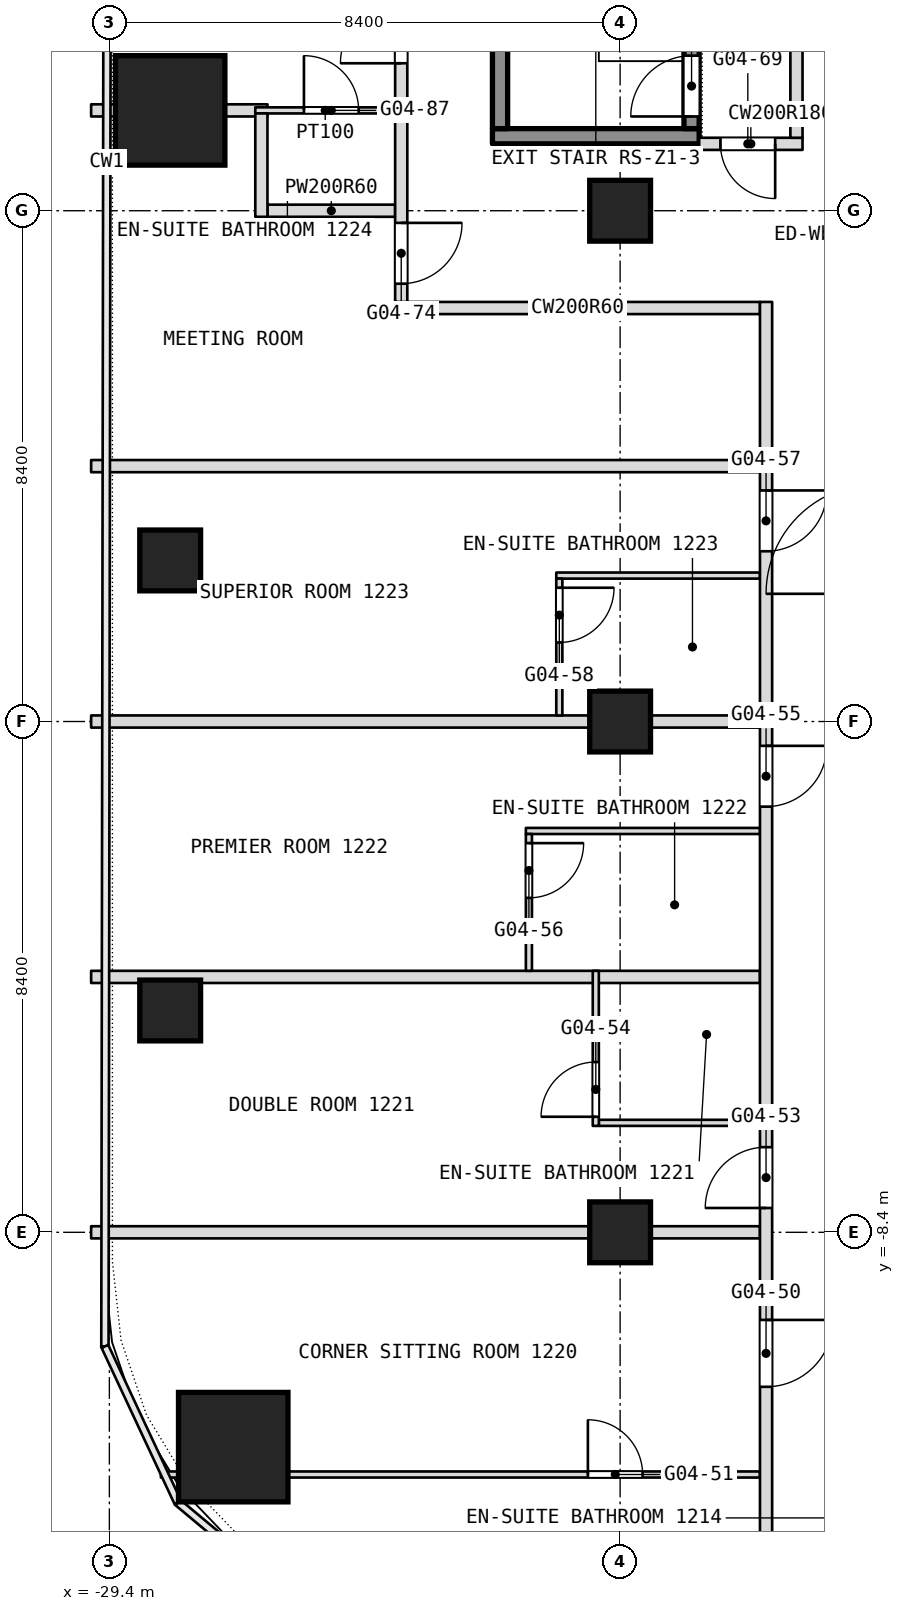
"""IFC4 building model, lengths in metres.
Left out: names, types, materials, properties, quantities, classifications, styles, units other than length and angle.
Written with IfcOpenShell. Run it as: python <this file> out.ifc"""

import sys

from ifc_helpers import new_model, si_unit, direction, frame, frame_2d, origin, origin_2d, place, context, subcontext, project, spatial, rectangle, extrude, element, fill, save


model = new_model("IFC4")
c1 = context("Model", 3, precision=1e-05, world=origin(), true_north=direction((0.0, 1.0)))
c2 = subcontext(c1, "Body", "Model", "MODEL_VIEW")
j1 = project(units=[si_unit("LENGTHUNIT", "METRE"), si_unit("PLANEANGLEUNIT", "RADIAN")], contexts=[c1])
p1 = place(None, origin())
s1 = spatial("IfcSite", under=j1, at=p1, CompositionType="ELEMENT")
p2 = place(p1, origin())
s2 = spatial("IfcBuilding", under=s1, at=p2, CompositionType="ELEMENT")
p3 = place(p2, frame((0.0, 0.0, 58.1)))
s3 = spatial("IfcBuildingStorey", under=s2, at=p3, CompositionType="ELEMENT", Elevation=58.1)
for number, where, z_axis, x_axis in (
    (1, (-27.363, -11.933, 0.0), (0.0, 0.0, 1.0), (1.0, 0.0, 0.0)),
    (2, (-28.4, 10.05, 0.0), (0.0, 0.0, 1.0), (1.0, 0.0, 0.0)),
):
    element("IfcColumn", number, at=place(p3, frame(where, z_axis=z_axis, x_axis=x_axis)), inside=s3, PredefinedType="COLUMN", context=c2, shape_type="SweptSolid", body=[
        extrude(rectangle(XDim=1.8, YDim=1.8, at=origin_2d()), origin(), (0.0, 0.0, 1.0), 3.6),
    ])
for number, where, z_axis, x_axis in (
    (3, (-21.0, -8.4, 0.0), (0.0, 0.0, 1.0), (1.0, 0.0, 0.0)),
    (4, (-21.0, 0.0, 0.0), (0.0, 0.0, 1.0), (1.0, 0.0, 0.0)),
    (5, (-21.0, 8.4, 0.0), (0.0, 0.0, 1.0), (1.0, 0.0, 0.0)),
    (6, (-28.4, -4.752, 0.0), (0.0, 0.0, 1.0), (1.0, 0.0, 0.0)),
    (7, (-28.4, 2.649, 0.0), (0.0, 0.0, 1.0), (1.0, 0.0, 0.0)),
):
    element("IfcColumn", number, at=place(p3, frame(where, z_axis=z_axis, x_axis=x_axis)), inside=s3, PredefinedType="COLUMN", context=c2, shape_type="SweptSolid", body=[
        extrude(rectangle(XDim=1.0, YDim=1.0, at=origin_2d()), origin(), (0.0, 0.0, 1.0), 3.6),
    ])
p4 = place(p3, frame((-28.553, -12.383, 0.0), z_axis=(0.0, 0.0, 1.0), x_axis=(1.0, 0.0, 0.0)))
e8 = element("IfcWall", 8, at=p4, inside=s3, PredefinedType="PARTITIONING", context=c2, shape_type="SweptSolid", body=[
    extrude(rectangle(XDim=0.29, YDim=0.1, at=frame_2d((0.145, 0.0))), origin(), (0.0, 0.0, 1.0), 3.34),
])
p5 = place(p3, frame((-26.463, -12.383, 0.0), z_axis=(0.0, 0.0, 1.0), x_axis=(1.0, 0.0, 0.0)))
e9 = element("IfcWall", 9, at=p5, inside=s3, PredefinedType="PARTITIONING", context=c2, shape_type="SweptSolid", body=[
    extrude(rectangle(XDim=7.763, YDim=0.1, at=frame_2d((3.881, 0.0))), origin(), (0.0, 0.0, 1.0), 3.34),
])
p6 = place(p5, frame((4.933, 0.0, 0.0)))
e10 = element("IfcOpeningElement", 10, at=p6, cuts=e9, PredefinedType="OPENING", context=c2, shape_type="SweptSolid", body=[
    extrude(rectangle(XDim=0.9, YDim=2.1, at=frame_2d((0.45, 1.05))), frame((0.0, 0.05, 0.0), z_axis=(0.0, -1.0, 0.0), x_axis=(1.0, 0.0, 0.0)), (0.0, 0.0, 1.0), 0.1),
])
p7 = place(p3, frame((-29.7, -8.4, 0.0), z_axis=(0.0, 0.0, 1.0), x_axis=(1.0, 0.0, 0.0)))
e11 = element("IfcWall", 11, at=p7, inside=s3, PredefinedType="PARTITIONING", context=c2, shape_type="SweptSolid", body=[
    extrude(rectangle(XDim=11.0, YDim=0.2, at=frame_2d((5.5, 0.0))), origin(), (0.0, 0.0, 1.0), 2.84),
])
p8 = place(p3, frame((-21.35, -6.6, 0.0), z_axis=(0.0, 0.0, 1.0), x_axis=(1.0, 0.0, 0.0)))
e12 = element("IfcWall", 12, at=p8, inside=s3, PredefinedType="PARTITIONING", context=c2, shape_type="SweptSolid", body=[
    extrude(rectangle(XDim=2.65, YDim=0.1, at=frame_2d((1.325, 0.0))), origin(), (0.0, 0.0, 1.0), 3.34),
])
p9 = place(p3, frame((-29.7, -4.2, 0.0), z_axis=(0.0, 0.0, 1.0), x_axis=(1.0, 0.0, 0.0)))
e13 = element("IfcWall", 13, at=p9, inside=s3, PredefinedType="PARTITIONING", context=c2, shape_type="SweptSolid", body=[
    extrude(rectangle(XDim=11.0, YDim=0.2, at=frame_2d((5.5, 0.0))), origin(), (0.0, 0.0, 1.0), 3.34),
])
p10 = place(p3, frame((-22.55, -1.8, 0.0), z_axis=(0.0, 0.0, 1.0), x_axis=(1.0, 0.0, 0.0)))
e14 = element("IfcWall", 14, at=p10, inside=s3, PredefinedType="PARTITIONING", context=c2, shape_type="SweptSolid", body=[
    extrude(rectangle(XDim=3.85, YDim=0.1, at=frame_2d((1.925, 0.0))), origin(), (0.0, 0.0, 1.0), 3.34),
])
p11 = place(p3, frame((-29.7, 0.0, 0.0), z_axis=(0.0, 0.0, 1.0), x_axis=(1.0, 0.0, 0.0)))
e15 = element("IfcWall", 15, at=p11, inside=s3, PredefinedType="PARTITIONING", context=c2, shape_type="SweptSolid", body=[
    extrude(rectangle(XDim=11.0, YDim=0.2, at=frame_2d((5.5, 0.0))), origin(), (0.0, 0.0, 1.0), 2.84),
])
p12 = place(p3, frame((-22.05, 2.4, 0.0), z_axis=(0.0, 0.0, 1.0), x_axis=(1.0, 0.0, 0.0)))
e16 = element("IfcWall", 16, at=p12, inside=s3, PredefinedType="PARTITIONING", context=c2, shape_type="SweptSolid", body=[
    extrude(rectangle(XDim=3.35, YDim=0.1, at=frame_2d((1.675, 0.0))), origin(), (0.0, 0.0, 1.0), 3.34),
])
p13 = place(p3, frame((-29.7, 4.2, 0.0), z_axis=(0.0, 0.0, 1.0), x_axis=(1.0, 0.0, 0.0)))
e17 = element("IfcWall", 17, at=p13, inside=s3, PredefinedType="PARTITIONING", context=c2, shape_type="SweptSolid", body=[
    extrude(rectangle(XDim=11.0, YDim=0.2, at=frame_2d((5.5, 0.0))), origin(), (0.0, 0.0, 1.0), 3.34),
])
p14 = place(p3, frame((-24.7, 6.8, 0.0), z_axis=(0.0, 0.0, 1.0), x_axis=(1.0, 0.0, 0.0)))
e18 = element("IfcWall", 18, at=p14, inside=s3, PredefinedType="PARTITIONING", context=c2, shape_type="SweptSolid", body=[
    extrude(rectangle(XDim=6.0, YDim=0.2, at=frame_2d((3.0, 0.0))), origin(), (0.0, 0.0, 1.0), 3.34),
])
p15 = place(p3, frame((-26.8, 8.4, 0.0), z_axis=(0.0, 0.0, 1.0), x_axis=(1.0, 0.0, 0.0)))
e19 = element("IfcWall", 19, at=p15, inside=s3, PredefinedType="PARTITIONING", context=c2, shape_type="SweptSolid", body=[
    extrude(rectangle(XDim=2.1, YDim=0.2, at=frame_2d((1.05, 0.0))), origin(), (0.0, 0.0, 1.0), 2.84),
])
p16 = place(p3, frame((-19.7, 9.5, 0.0), z_axis=(0.0, 0.0, 1.0), x_axis=(1.0, 0.0, 0.0)))
e20 = element("IfcWall", 20, at=p16, inside=s3, PredefinedType="PARTITIONING", context=c2, shape_type="SweptSolid", body=[
    extrude(rectangle(XDim=1.7, YDim=0.2, at=frame_2d((0.85, 0.0))), origin(), (0.0, 0.0, 1.0), 3.34),
])
p17 = place(p16, frame((0.35, 0.0, 0.0)))
e21 = element("IfcOpeningElement", 21, at=p17, cuts=e20, PredefinedType="OPENING", context=c2, shape_type="SweptSolid", body=[
    extrude(rectangle(XDim=0.9, YDim=2.1, at=frame_2d((0.45, 1.05))), frame((0.0, 0.1, 0.0), z_axis=(0.0, -1.0, 0.0), x_axis=(1.0, 0.0, 0.0)), (0.0, 0.0, 1.0), 0.2),
])
p18 = place(p3, frame((-29.7, 10.05, 0.0), z_axis=(0.0, 0.0, 1.0), x_axis=(1.0, 0.0, 0.0)))
e22 = element("IfcWall", 22, at=p18, inside=s3, PredefinedType="PARTITIONING", context=c2, shape_type="SweptSolid", body=[
    extrude(rectangle(XDim=0.4, YDim=0.2, at=frame_2d((0.2, 0.0))), origin(), (0.0, 0.0, 1.0), 3.34),
])
p19 = place(p3, frame((-27.5, 10.05, 0.0), z_axis=(0.0, 0.0, 1.0), x_axis=(1.0, 0.0, 0.0)))
e23 = element("IfcWall", 23, at=p19, inside=s3, PredefinedType="PARTITIONING", context=c2, shape_type="SweptSolid", body=[
    extrude(rectangle(XDim=0.7, YDim=0.2, at=frame_2d((0.35, 0.0))), origin(), (0.0, 0.0, 1.0), 3.34),
])
p20 = place(p3, frame((-27.0, 10.05, 0.0), z_axis=(0.0, 0.0, 1.0), x_axis=(1.0, 0.0, 0.0)))
e24 = element("IfcWall", 24, at=p20, inside=s3, PredefinedType="PARTITIONING", context=c2, shape_type="SweptSolid", body=[
    extrude(rectangle(XDim=2.3, YDim=0.1, at=frame_2d((1.15, 0.0))), origin(), (0.0, 0.0, 1.0), 3.34),
])
p21 = place(p20, frame((0.8, 0.0, 0.0)))
e25 = element("IfcOpeningElement", 25, at=p21, cuts=e24, PredefinedType="OPENING", context=c2, shape_type="SweptSolid", body=[
    extrude(rectangle(XDim=0.9, YDim=2.1, at=frame_2d((0.45, 1.05))), frame((0.0, 0.05, 0.0), z_axis=(0.0, -1.0, 0.0), x_axis=(1.0, 0.0, 0.0)), (0.0, 0.0, 1.0), 0.1),
])
p22 = place(p3, frame((-18.1, 9.6, 0.0), z_axis=(0.0, 0.0, 1.0), x_axis=(0.0, 1.0, 0.0)))
e26 = element("IfcWall", 26, at=p22, inside=s3, PredefinedType="PARTITIONING", context=c2, shape_type="SweptSolid", body=[
    extrude(rectangle(XDim=6.2, YDim=0.2, at=frame_2d((3.1, 0.0))), origin(), (0.0, 0.0, 1.0), 3.34),
])
p23 = place(p3, frame((-18.6, -16.665, 0.0), z_axis=(0.0, 0.0, 1.0), x_axis=(0.0, 1.0, 0.0)))
e27 = element("IfcWall", 27, at=p23, inside=s3, PredefinedType="PARTITIONING", context=c2, shape_type="SweptSolid", body=[
    extrude(rectangle(XDim=23.565, YDim=0.2, at=frame_2d((11.782, 0.0))), origin(), (0.0, 0.0, 1.0), 3.34),
])
p24 = place(p23, frame((5.724, 0.0, 0.0)))
e28 = element("IfcOpeningElement", 28, at=p24, cuts=e27, PredefinedType="OPENING", context=c2, shape_type="SweptSolid", body=[
    extrude(rectangle(XDim=1.1, YDim=2.1, at=frame_2d((0.55, 1.05))), frame((0.0, 0.1, 0.0), z_axis=(0.0, -1.0, 0.0), x_axis=(1.0, 0.0, 0.0)), (0.0, 0.0, 1.0), 0.2),
])
p25 = place(p23, frame((8.665, 0.0, 0.0)))
e29 = element("IfcOpeningElement", 29, at=p25, cuts=e27, PredefinedType="OPENING", context=c2, shape_type="SweptSolid", body=[
    extrude(rectangle(XDim=1.0, YDim=2.1, at=frame_2d((0.5, 1.05))), frame((0.0, 0.1, 0.0), z_axis=(0.0, -1.0, 0.0), x_axis=(1.0, 0.0, 0.0)), (0.0, 0.0, 1.0), 0.2),
])
p26 = place(p23, frame((15.265, 0.0, 0.0)))
e30 = element("IfcOpeningElement", 30, at=p26, cuts=e27, PredefinedType="OPENING", context=c2, shape_type="SweptSolid", body=[
    extrude(rectangle(XDim=1.0, YDim=2.1, at=frame_2d((0.5, 1.05))), frame((0.0, 0.1, 0.0), z_axis=(0.0, -1.0, 0.0), x_axis=(1.0, 0.0, 0.0)), (0.0, 0.0, 1.0), 0.2),
])
p27 = place(p23, frame((19.465, 0.0, 0.0)))
e31 = element("IfcOpeningElement", 31, at=p27, cuts=e27, PredefinedType="OPENING", context=c2, shape_type="SweptSolid", body=[
    extrude(rectangle(XDim=1.0, YDim=2.1, at=frame_2d((0.5, 1.05))), frame((0.0, 0.1, 0.0), z_axis=(0.0, -1.0, 0.0), x_axis=(1.0, 0.0, 0.0)), (0.0, 0.0, 1.0), 0.2),
])
p28 = place(p3, frame((-21.4, -6.65, 0.0), z_axis=(0.0, 0.0, 1.0), x_axis=(0.0, 1.0, 0.0)))
e32 = element("IfcWall", 32, at=p28, inside=s3, PredefinedType="PARTITIONING", context=c2, shape_type="SweptSolid", body=[
    extrude(rectangle(XDim=2.55, YDim=0.1, at=frame_2d((1.275, 0.0))), origin(), (0.0, 0.0, 1.0), 3.34),
])
p29 = place(p28, frame((0.15, 0.0, 0.0)))
e33 = element("IfcOpeningElement", 33, at=p29, cuts=e32, PredefinedType="OPENING", context=c2, shape_type="SweptSolid", body=[
    extrude(rectangle(XDim=0.9, YDim=2.1, at=frame_2d((0.45, 1.05))), frame((0.0, 0.05, 0.0), z_axis=(0.0, -1.0, 0.0), x_axis=(1.0, 0.0, 0.0)), (0.0, 0.0, 1.0), 0.1),
])
p30 = place(p3, frame((-22.0, 0.1, 0.0), z_axis=(0.0, 0.0, 1.0), x_axis=(0.0, 1.0, 0.0)))
e34 = element("IfcWall", 34, at=p30, inside=s3, PredefinedType="PARTITIONING", context=c2, shape_type="SweptSolid", body=[
    extrude(rectangle(XDim=2.25, YDim=0.1, at=frame_2d((1.125, 0.0))), origin(), (0.0, 0.0, 1.0), 3.34),
])
p31 = place(p30, frame((1.2, 0.0, 0.0)))
e35 = element("IfcOpeningElement", 35, at=p31, cuts=e34, PredefinedType="OPENING", context=c2, shape_type="SweptSolid", body=[
    extrude(rectangle(XDim=0.9, YDim=2.1, at=frame_2d((0.45, 1.05))), frame((0.0, 0.05, 0.0), z_axis=(0.0, -1.0, 0.0), x_axis=(1.0, 0.0, 0.0)), (0.0, 0.0, 1.0), 0.1),
])
p32 = place(p3, frame((-22.5, -4.1, 0.0), z_axis=(0.0, 0.0, 1.0), x_axis=(0.0, 1.0, 0.0)))
e36 = element("IfcWall", 36, at=p32, inside=s3, PredefinedType="PARTITIONING", context=c2, shape_type="SweptSolid", body=[
    extrude(rectangle(XDim=2.25, YDim=0.1, at=frame_2d((1.125, 0.0))), origin(), (0.0, 0.0, 1.0), 3.34),
])
p33 = place(p32, frame((1.2, 0.0, 0.0)))
e37 = element("IfcOpeningElement", 37, at=p33, cuts=e36, PredefinedType="OPENING", context=c2, shape_type="SweptSolid", body=[
    extrude(rectangle(XDim=0.9, YDim=2.1, at=frame_2d((0.45, 1.05))), frame((0.0, 0.05, 0.0), z_axis=(0.0, -1.0, 0.0), x_axis=(1.0, 0.0, 0.0)), (0.0, 0.0, 1.0), 0.1),
])
p34 = place(p3, frame((-24.6, 6.9, 0.0), z_axis=(0.0, 0.0, 1.0), x_axis=(0.0, 1.0, 0.0)))
e38 = element("IfcWall", 38, at=p34, inside=s3, PredefinedType="PARTITIONING", context=c2, shape_type="SweptSolid", body=[
    extrude(rectangle(XDim=11.6, YDim=0.2, at=frame_2d((5.8, 0.0))), origin(), (0.0, 0.0, 1.0), 3.34),
])
p35 = place(p34, frame((8.5, 0.0, 0.0)))
e39 = element("IfcOpeningElement", 39, at=p35, cuts=e38, PredefinedType="OPENING", context=c2, shape_type="SweptSolid", body=[
    extrude(rectangle(XDim=1.0, YDim=2.1, at=frame_2d((0.5, 1.05))), frame((0.0, 0.1, 0.0), z_axis=(0.0, -1.0, 0.0), x_axis=(1.0, 0.0, 0.0)), (0.0, 0.0, 1.0), 0.2),
])
p36 = place(p34, frame((10.2, 0.0, 0.0)))
e40 = element("IfcOpeningElement", 40, at=p36, cuts=e38, PredefinedType="OPENING", context=c2, shape_type="SweptSolid", body=[
    extrude(rectangle(XDim=1.0, YDim=2.1, at=frame_2d((0.5, 1.05))), frame((0.0, 0.1, 0.0), z_axis=(0.0, -1.0, 0.0), x_axis=(1.0, 0.0, 0.0)), (0.0, 0.0, 1.0), 0.2),
])
p37 = place(p34, frame((0.3, 0.0, 0.0)))
e41 = element("IfcOpeningElement", 41, at=p37, cuts=e38, PredefinedType="OPENING", context=c2, shape_type="SweptSolid", body=[
    extrude(rectangle(XDim=1.0, YDim=2.1, at=frame_2d((0.5, 1.05))), frame((0.0, 0.1, 0.0), z_axis=(0.0, -1.0, 0.0), x_axis=(1.0, 0.0, 0.0)), (0.0, 0.0, 1.0), 0.2),
])
p38 = place(p34, frame((3.925, 0.0, 0.0)))
e42 = element("IfcOpeningElement", 42, at=p38, cuts=e38, PredefinedType="OPENING", context=c2, shape_type="SweptSolid", body=[
    extrude(rectangle(XDim=1.0, YDim=2.1, at=frame_2d((0.5, 1.05))), frame((0.0, 0.1, 0.0), z_axis=(0.0, -1.0, 0.0), x_axis=(1.0, 0.0, 0.0)), (0.0, 0.0, 1.0), 0.2),
])
p39 = place(p3, frame((-26.9, 8.3, 0.0), z_axis=(0.0, 0.0, 1.0), x_axis=(0.0, 1.0, 0.0)))
e43 = element("IfcWall", 43, at=p39, inside=s3, PredefinedType="PARTITIONING", context=c2, shape_type="SweptSolid", body=[
    extrude(rectangle(XDim=1.7, YDim=0.2, at=frame_2d((0.85, 0.0))), origin(), (0.0, 0.0, 1.0), 3.34),
])
p40 = place(p3, frame((-23.1, 9.625, 0.1), z_axis=(0.0, 0.0, 1.0), x_axis=(1.0, 0.0, 0.0)))
e44 = element("IfcWall", 44, at=p40, inside=s3, PredefinedType="SHEAR", context=c2, shape_type="SweptSolid", body=[
    extrude(rectangle(XDim=3.4, YDim=0.25, at=frame_2d((1.7, 0.0))), origin(), (0.0, 0.0, 1.0), 3.6),
])
p41 = place(p3, frame((-22.975, 9.75, 0.1), z_axis=(0.0, 0.0, 1.0), x_axis=(0.0, 1.0, 0.0)))
e45 = element("IfcWall", 45, at=p41, inside=s3, PredefinedType="SHEAR", context=c2, shape_type="SweptSolid", body=[
    extrude(rectangle(XDim=5.7, YDim=0.25, at=frame_2d((2.85, 0.0))), origin(), (0.0, 0.0, 1.0), 3.6),
])
p42 = place(p3, frame((-19.825, 9.75, 0.1), z_axis=(0.0, 0.0, 1.0), x_axis=(0.0, 1.0, 0.0)))
e46 = element("IfcWall", 46, at=p42, inside=s3, PredefinedType="SHEAR", context=c2, shape_type="SweptSolid", body=[
    extrude(rectangle(XDim=5.7, YDim=0.25, at=frame_2d((2.85, 0.0))), origin(), (0.0, 0.0, 1.0), 3.6),
])
p43 = place(p42, frame((0.2, 0.0, 0.0)))
e47 = element("IfcOpeningElement", 47, at=p43, cuts=e46, PredefinedType="OPENING", context=c2, shape_type="SweptSolid", body=[
    extrude(rectangle(XDim=1.0, YDim=2.1, at=frame_2d((0.5, 1.05))), frame((0.0, 0.125, 0.0), z_axis=(0.0, -1.0, 0.0), x_axis=(1.0, 0.0, 0.0)), (0.0, 0.0, 1.0), 0.25),
])
p44 = place(p6, origin())
e48 = element("IfcDoor", 48, at=p44, inside=s3, OperationType="SINGLE_SWING_LEFT", PredefinedType="DOOR", context=c2, shape_type="SweptSolid", body=[
    extrude(rectangle(XDim=0.9, YDim=2.1, at=frame_2d((0.45, 1.05))), frame((0.0, 0.025, 0.0), z_axis=(0.0, -1.0, 0.0), x_axis=(1.0, 0.0, 0.0)), (0.0, 0.0, 1.0), 0.05),
])
fill(e10, e48)
p45 = place(p17, origin())
e49 = element("IfcDoor", 49, at=p45, inside=s3, OperationType="SINGLE_SWING_RIGHT", PredefinedType="DOOR", context=c2, shape_type="SweptSolid", body=[
    extrude(rectangle(XDim=0.9, YDim=2.1, at=frame_2d((0.45, 1.05))), frame((0.0, 0.025, 0.0), z_axis=(0.0, -1.0, 0.0), x_axis=(1.0, 0.0, 0.0)), (0.0, 0.0, 1.0), 0.05),
])
fill(e21, e49)
p46 = place(p21, origin())
e50 = element("IfcDoor", 50, at=p46, inside=s3, OperationType="SINGLE_SWING_LEFT", PredefinedType="DOOR", context=c2, shape_type="SweptSolid", body=[
    extrude(rectangle(XDim=0.9, YDim=2.1, at=frame_2d((0.45, 1.05))), frame((0.0, 0.025, 0.0), z_axis=(0.0, -1.0, 0.0), x_axis=(1.0, 0.0, 0.0)), (0.0, 0.0, 1.0), 0.05),
])
fill(e25, e50)
p47 = place(p24, origin())
e51 = element("IfcDoor", 51, at=p47, inside=s3, OperationType="SINGLE_SWING_RIGHT", PredefinedType="DOOR", context=c2, shape_type="SweptSolid", body=[
    extrude(rectangle(XDim=1.1, YDim=2.1, at=frame_2d((0.55, 1.05))), frame((0.0, 0.025, 0.0), z_axis=(0.0, -1.0, 0.0), x_axis=(1.0, 0.0, 0.0)), (0.0, 0.0, 1.0), 0.05),
])
fill(e28, e51)
p48 = place(p25, origin())
e52 = element("IfcDoor", 52, at=p48, inside=s3, OperationType="SINGLE_SWING_RIGHT", PredefinedType="DOOR", context=c2, shape_type="SweptSolid", body=[
    extrude(rectangle(XDim=1.0, YDim=2.1, at=frame_2d((0.5, 1.05))), frame((0.0, 0.025, 0.0), z_axis=(0.0, -1.0, 0.0), x_axis=(1.0, 0.0, 0.0)), (0.0, 0.0, 1.0), 0.05),
])
fill(e29, e52)
p49 = place(p26, origin())
e53 = element("IfcDoor", 53, at=p49, inside=s3, OperationType="SINGLE_SWING_RIGHT", PredefinedType="DOOR", context=c2, shape_type="SweptSolid", body=[
    extrude(rectangle(XDim=1.0, YDim=2.1, at=frame_2d((0.5, 1.05))), frame((0.0, 0.025, 0.0), z_axis=(0.0, -1.0, 0.0), x_axis=(1.0, 0.0, 0.0)), (0.0, 0.0, 1.0), 0.05),
])
fill(e30, e53)
p50 = place(p27, origin())
e54 = element("IfcDoor", 54, at=p50, inside=s3, OperationType="SINGLE_SWING_RIGHT", PredefinedType="DOOR", context=c2, shape_type="SweptSolid", body=[
    extrude(rectangle(XDim=1.0, YDim=2.1, at=frame_2d((0.5, 1.05))), frame((0.0, 0.025, 0.0), z_axis=(0.0, -1.0, 0.0), x_axis=(1.0, 0.0, 0.0)), (0.0, 0.0, 1.0), 0.05),
])
fill(e31, e54)
p51 = place(p29, origin())
e55 = element("IfcDoor", 55, at=p51, inside=s3, OperationType="SINGLE_SWING_RIGHT", PredefinedType="DOOR", context=c2, shape_type="SweptSolid", body=[
    extrude(rectangle(XDim=0.9, YDim=2.1, at=frame_2d((0.45, 1.05))), frame((0.0, 0.025, 0.0), z_axis=(0.0, -1.0, 0.0), x_axis=(1.0, 0.0, 0.0)), (0.0, 0.0, 1.0), 0.05),
])
fill(e33, e55)
p52 = place(p31, origin())
e56 = element("IfcDoor", 56, at=p52, inside=s3, OperationType="SINGLE_SWING_LEFT", PredefinedType="DOOR", context=c2, shape_type="SweptSolid", body=[
    extrude(rectangle(XDim=0.9, YDim=2.1, at=frame_2d((0.45, 1.05))), frame((0.0, 0.025, 0.0), z_axis=(0.0, -1.0, 0.0), x_axis=(1.0, 0.0, 0.0)), (0.0, 0.0, 1.0), 0.05),
])
fill(e35, e56)
p53 = place(p33, origin())
e57 = element("IfcDoor", 57, at=p53, inside=s3, OperationType="SINGLE_SWING_LEFT", PredefinedType="DOOR", context=c2, shape_type="SweptSolid", body=[
    extrude(rectangle(XDim=0.9, YDim=2.1, at=frame_2d((0.45, 1.05))), frame((0.0, 0.025, 0.0), z_axis=(0.0, -1.0, 0.0), x_axis=(1.0, 0.0, 0.0)), (0.0, 0.0, 1.0), 0.05),
])
fill(e37, e57)
p54 = place(p37, origin())
e58 = element("IfcDoor", 58, at=p54, inside=s3, OperationType="SINGLE_SWING_LEFT", PredefinedType="DOOR", context=c2, shape_type="SweptSolid", body=[
    extrude(rectangle(XDim=1.0, YDim=2.1, at=frame_2d((0.5, 1.05))), frame((0.0, 0.025, 0.0), z_axis=(0.0, -1.0, 0.0), x_axis=(1.0, 0.0, 0.0)), (0.0, 0.0, 1.0), 0.05),
])
fill(e41, e58)
p55 = place(p38, origin())
e59 = element("IfcDoor", 59, at=p55, inside=s3, OperationType="SINGLE_SWING_LEFT", PredefinedType="DOOR", context=c2, shape_type="SweptSolid", body=[
    extrude(rectangle(XDim=1.0, YDim=2.1, at=frame_2d((0.5, 1.05))), frame((0.0, 0.025, 0.0), z_axis=(0.0, -1.0, 0.0), x_axis=(1.0, 0.0, 0.0)), (0.0, 0.0, 1.0), 0.05),
])
fill(e42, e59)
p56 = place(p43, origin())
e60 = element("IfcDoor", 60, at=p56, inside=s3, OperationType="SINGLE_SWING_LEFT", PredefinedType="DOOR", context=c2, shape_type="SweptSolid", body=[
    extrude(rectangle(XDim=1.0, YDim=2.1, at=frame_2d((0.5, 1.05))), frame((0.0, 0.025, 0.0), z_axis=(0.0, -1.0, 0.0), x_axis=(1.0, 0.0, 0.0)), (0.0, 0.0, 1.0), 0.05),
])
fill(e47, e60)
save(model, sys.argv[1])
